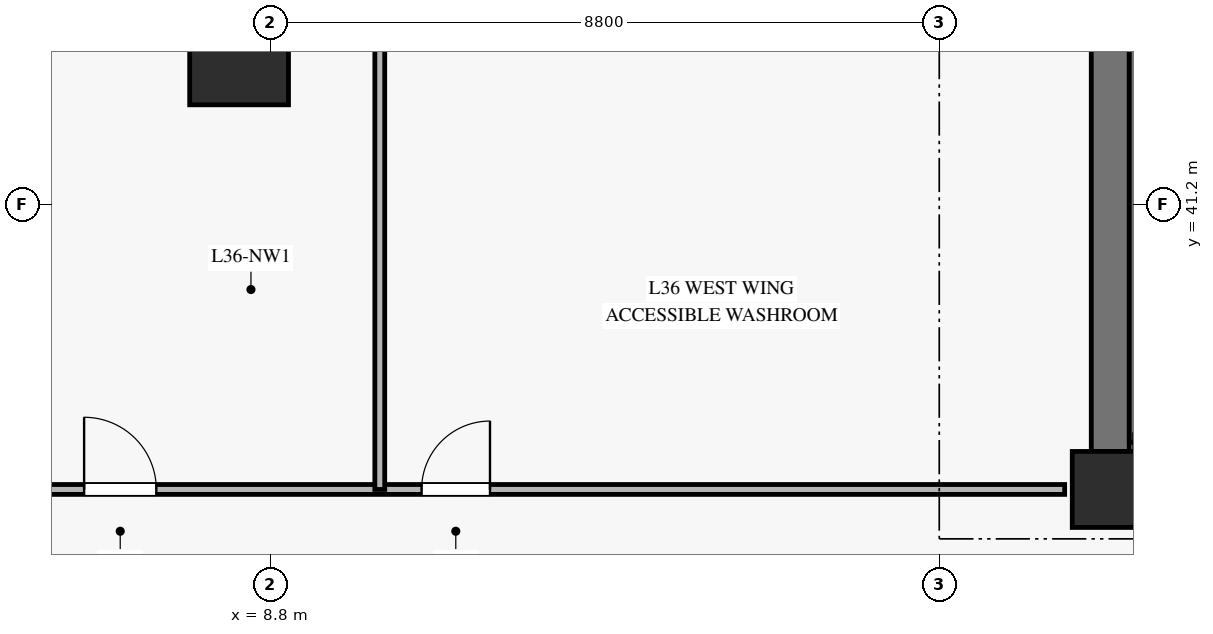
"""IFC4 building model, lengths in metres.
Left out: names, types, materials, properties, quantities, classifications, styles, units other than length and angle.
Written with IfcOpenShell. Run it as: python <this file> out.ifc"""

import sys

from ifc_helpers import new_model, si_unit, direction, frame, frame_2d, origin, origin_2d, place, context, subcontext, project, spatial, rectangle, hollow_rectangle, extrude, source, transform, mapped, element, fill, save


model = new_model("IFC4")
c1 = context("Model", 3, precision=1e-05, world=origin(), true_north=direction((0.0, 1.0)))
c2 = subcontext(c1, "Body", "Model", "MODEL_VIEW")
j1 = project(units=[si_unit("LENGTHUNIT", "METRE"), si_unit("PLANEANGLEUNIT", "RADIAN")], contexts=[c1])
p1 = place(None, origin())
s1 = spatial("IfcSite", under=j1, at=p1, CompositionType="ELEMENT")
p2 = place(p1, origin())
s2 = spatial("IfcBuilding", under=s1, at=p2, CompositionType="ELEMENT")
p3 = place(p2, frame((0.0, 0.0, 149.2)))
s3 = spatial("IfcBuildingStorey", under=s2, at=p3, CompositionType="ELEMENT", Elevation=149.2)
m1 = source(origin(), c2, "Body", "SweptSolid", [
    extrude(rectangle(XDim=1.0, YDim=1.0, at=origin_2d()), origin(), (0.0, 0.0, 1.0), 3.27),
])
p4 = place(p3, frame((19.85, 37.45, 0.0), z_axis=(0.0, 0.0, 1.0), x_axis=(1.0, 0.0, 0.0)))
e1 = element("IfcColumn", 1, at=p4, inside=s3, PredefinedType="PILASTER", context=c2, shape_type="MappedRepresentation", body=[
    mapped(m1, transform((0.0, 0.0, 0.0), x_axis=(1.0, 0.0, 0.0), y_axis=(0.0, 1.0, 0.0), z_axis=(0.0, 0.0, 1.0), scale=1.0)),
])
p5 = place(p3, frame((19.85, 37.95, 0.0), z_axis=(0.0, 0.0, 1.0), x_axis=(0.0, 1.0, 0.0)))
e2 = element("IfcWall", 2, at=p5, inside=s3, PredefinedType="SHEAR", context=c2, shape_type="SweptSolid", body=[
    extrude(rectangle(XDim=8.1, YDim=0.5, at=frame_2d((4.05, 0.0))), origin(), (0.0, 0.0, 1.0), 3.27),
])
m2 = source(origin(), c2, "Body", "SweptSolid", [
    extrude(hollow_rectangle(XDim=1.3, YDim=1.3, WallThickness=0.06, at=origin_2d()), origin(), (0.0, 0.0, 1.0), 3.27),
])
p6 = place(p3, frame((8.388, 43.161, 0.0), z_axis=(0.0, 0.0, 1.0), x_axis=(1.0, 0.0, 0.0)))
e3 = element("IfcColumn", 3, at=p6, inside=s3, PredefinedType="COLUMN", context=c2, shape_type="MappedRepresentation", body=[
    mapped(m2, transform((0.0, 0.0, 0.0), x_axis=(1.0, 0.0, 0.0), y_axis=(0.0, 1.0, 0.0), z_axis=(0.0, 0.0, 1.0), scale=1.0)),
])
p7 = place(p3, frame((7.988, 46.25, 0.0), z_axis=(0.0, 0.0, 1.0), x_axis=(-0.634975058906, -0.772532636571, 0.0)))
e4 = element("IfcWall", 4, at=p7, inside=s3, PredefinedType="SOLIDWALL", context=c2, shape_type="SweptSolid", body=[
    extrude(rectangle(XDim=3.999, YDim=0.3, at=frame_2d((2.0, 0.0))), origin(), (0.0, 0.0, 1.0), 2.75),
])
p8 = place(p7, frame((1.199, 0.0, 0.45)))
e5 = element("IfcOpeningElement", 5, at=p8, cuts=e4, PredefinedType="OPENING", context=c2, shape_type="SweptSolid", body=[
    extrude(rectangle(XDim=1.6, YDim=2.0, at=frame_2d((0.8, 1.0))), frame((0.0, 0.16, 0.0), z_axis=(0.0, -1.0, 0.0), x_axis=(1.0, 0.0, 0.0)), (0.0, 0.0, 1.0), 0.32),
])
p9 = place(p3, frame((20.17, 38.07, 0.0), z_axis=(0.0, 0.0, 1.0), x_axis=(0.0, 1.0, 0.0)))
e6 = element("IfcWall", 6, at=p9, inside=s3, PredefinedType="SOLIDWALL", context=c2, shape_type="SweptSolid", body=[
    extrude(rectangle(XDim=7.25, YDim=0.14, at=frame_2d((3.625, 0.0))), origin(), (0.0, 0.0, 1.0), 3.5),
])
p10 = place(p3, frame((5.449, 37.45, 0.0), z_axis=(0.0, 0.0, 1.0), x_axis=(1.0, 0.0, 0.0)))
e7 = element("IfcWall", 7, at=p10, inside=s3, PredefinedType="PARTITIONING", context=c2, shape_type="SweptSolid", body=[
    extrude(rectangle(XDim=13.801, YDim=0.13, at=frame_2d((6.9, 0.0))), origin(), (0.0, 0.0, 1.0), 2.755),
])
p11 = place(p10, frame((0.9, 0.0, 0.0)))
e8 = element("IfcOpeningElement", 8, at=p11, cuts=e7, PredefinedType="OPENING", context=c2, shape_type="SweptSolid", body=[
    extrude(rectangle(XDim=0.95, YDim=2.1, at=frame_2d((0.475, 1.05))), frame((0.0, 0.075, 0.0), z_axis=(0.0, -1.0, 0.0), x_axis=(1.0, 0.0, 0.0)), (0.0, 0.0, 1.0), 0.15),
])
p12 = place(p10, frame((5.34, 0.0, 0.0)))
e9 = element("IfcOpeningElement", 9, at=p12, cuts=e7, PredefinedType="OPENING", context=c2, shape_type="SweptSolid", body=[
    extrude(rectangle(XDim=0.9, YDim=2.1, at=frame_2d((0.45, 1.05))), frame((0.0, 0.075, 0.0), z_axis=(0.0, -1.0, 0.0), x_axis=(1.0, 0.0, 0.0)), (0.0, 0.0, 1.0), 0.15),
])
p13 = place(p3, frame((10.239, 37.45, 0.0), z_axis=(0.0, 0.0, 1.0), x_axis=(0.0, 1.0, 0.0)))
e10 = element("IfcWall", 10, at=p13, inside=s3, PredefinedType="PARTITIONING", context=c2, shape_type="SweptSolid", body=[
    extrude(rectangle(XDim=8.8, YDim=0.13, at=frame_2d((4.4, 0.0))), origin(), (0.0, 0.0, 1.0), 3.27),
])
m3 = source(origin(), c2, "Body", "SweptSolid", [
    extrude(rectangle(XDim=0.95, YDim=2.1, at=frame_2d((0.475, 1.05))), frame((0.0, 0.025, 0.0), z_axis=(0.0, -1.0, 0.0), x_axis=(1.0, 0.0, 0.0)), (0.0, 0.0, 1.0), 0.05),
])
p14 = place(p11, origin())
e11 = element("IfcDoor", 11, at=p14, inside=s3, OperationType="SINGLE_SWING_LEFT", PredefinedType="DOOR", context=c2, shape_type="MappedRepresentation", body=[
    mapped(m3, transform((0.0, 0.0, 0.0), x_axis=(1.0, 0.0, 0.0), y_axis=(0.0, 1.0, 0.0), z_axis=(0.0, 0.0, 1.0), scale=1.0)),
])
fill(e8, e11)
m4 = source(origin(), c2, "Body", "SweptSolid", [
    extrude(rectangle(XDim=0.9, YDim=2.1, at=frame_2d((0.45, 1.05))), frame((0.0, 0.025, 0.0), z_axis=(0.0, -1.0, 0.0), x_axis=(1.0, 0.0, 0.0)), (0.0, 0.0, 1.0), 0.05),
])
p15 = place(p12, origin())
e12 = element("IfcDoor", 12, at=p15, inside=s3, OperationType="SINGLE_SWING_RIGHT", PredefinedType="DOOR", context=c2, shape_type="MappedRepresentation", body=[
    mapped(m4, transform((0.0, 0.0, 0.0), x_axis=(1.0, 0.0, 0.0), y_axis=(0.0, 1.0, 0.0), z_axis=(0.0, 0.0, 1.0), scale=1.0)),
])
fill(e9, e12)
save(model, sys.argv[1])
